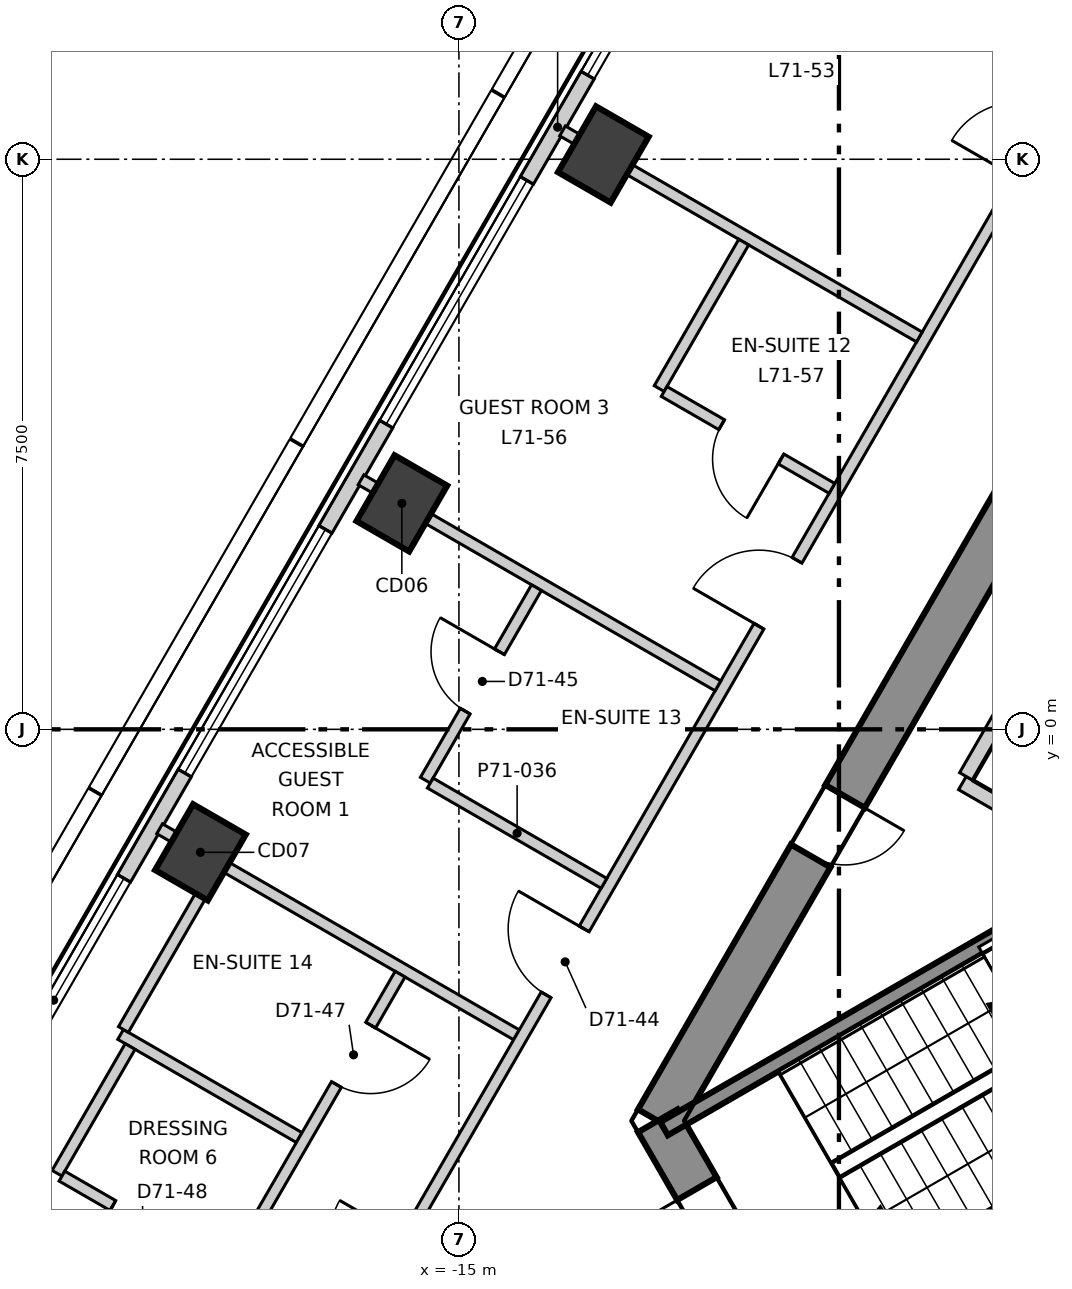
"""IFC4 building model, lengths in metres.
Left out: names, types, materials, properties, quantities, classifications, styles, units other than length and angle.
Written with IfcOpenShell. Run it as: python <this file> out.ifc"""

import sys

from ifc_helpers import new_model, si_unit, direction, frame, frame_2d, origin, origin_2d, place, context, subcontext, project, spatial, polyline, rectangle, outline, extrude, element, fill, save


model = new_model("IFC4")
c1 = context("Model", 3, precision=1e-05, world=origin(), true_north=direction((0.0, 1.0)))
c2 = subcontext(c1, "Body", "Model", "MODEL_VIEW")
j1 = project(units=[si_unit("LENGTHUNIT", "METRE"), si_unit("PLANEANGLEUNIT", "RADIAN")], contexts=[c1])
p1 = place(None, origin())
s1 = spatial("IfcSite", under=j1, at=p1, CompositionType="ELEMENT")
p2 = place(p1, origin())
s2 = spatial("IfcBuilding", under=s1, at=p2, CompositionType="ELEMENT")
p3 = place(p2, frame((0.0, 0.0, 300.7)))
s3 = spatial("IfcBuildingStorey", under=s2, at=p3, CompositionType="ELEMENT", Elevation=300.7)
p4 = place(p3, frame((-1.732, 13.3, -0.3), z_axis=(0.0, 0.0, 1.0), x_axis=(-0.500000539815, -0.866025092122, 0.0)))
e1 = element("IfcWall", 1, at=p4, inside=s3, PredefinedType="SHEAR", context=c2, shape_type="SweptSolid", body=[
    extrude(outline(polyline([(-0.173, -0.3), (1.795, -0.3), (3.763, -0.3), (5.732, -0.3), (7.7, -0.3), (9.668, -0.301), (11.637, -0.301), (13.605, -0.301), (15.573, -0.301), (17.542, -0.301), (19.51, -0.301), (21.478, -0.301), (21.131, 0.3), (19.226, 0.3), (17.321, 0.3), (15.415, 0.3), (13.51, 0.3), (11.605, 0.3), (9.699, 0.3), (7.794, 0.3), (5.889, 0.3), (3.984, 0.3), (2.078, 0.3), (0.173, 0.3), (-0.173, -0.3)])), origin(), (0.0, 0.0, 1.0), 3.6),
])
p5 = place(p4, frame((10.102, 0.0, 0.3)))
e2 = element("IfcOpeningElement", 2, at=p5, cuts=e1, PredefinedType="OPENING", context=c2, shape_type="SweptSolid", body=[
    extrude(rectangle(XDim=1.1, YDim=2.1, at=frame_2d((0.55, 1.05))), frame((0.0, 0.31, 0.0), z_axis=(0.0, -1.0, 0.0), x_axis=(1.0, 0.0, 0.0)), (0.0, 0.0, 1.0), 0.621),
])
p6 = place(p4, frame((16.378, 0.0, 0.3)))
e3 = element("IfcOpeningElement", 3, at=p6, cuts=e1, PredefinedType="OPENING", context=c2, shape_type="SweptSolid", body=[
    extrude(rectangle(XDim=0.9, YDim=2.1, at=frame_2d((0.45, 1.05))), frame((0.0, 0.31, 0.0), z_axis=(0.0, -1.0, 0.0), x_axis=(1.0, 0.0, 0.0)), (0.0, 0.0, 1.0), 0.621),
])
p7 = place(p4, frame((4.026, 0.0, 0.3)))
e4 = element("IfcOpeningElement", 4, at=p7, cuts=e1, PredefinedType="OPENING", context=c2, shape_type="SweptSolid", body=[
    extrude(rectangle(XDim=0.9, YDim=2.1, at=frame_2d((0.45, 1.05))), frame((0.0, 0.31, 0.0), z_axis=(0.0, -1.0, 0.0), x_axis=(1.0, 0.0, 0.0)), (0.0, 0.0, 1.0), 0.621),
])
p8 = place(p3, frame((-12.384, -5.15, -0.3), z_axis=(0.0, 0.0, 1.0), x_axis=(0.49997462182, -0.866040055388, 0.0)))
e5 = element("IfcWall", 5, at=p8, inside=s3, PredefinedType="SHEAR", context=c2, shape_type="SweptSolid", body=[
    extrude(outline(polyline([(-0.173, -0.301), (1.732, -0.301), (3.637, -0.3), (3.291, 0.3), (1.732, 0.3), (0.173, 0.3), (-0.173, -0.301)])), origin(), (0.0, 0.0, 1.0), 3.6),
])
p9 = place(p8, frame((1.032, 0.0, 0.3)))
e6 = element("IfcOpeningElement", 6, at=p9, cuts=e5, PredefinedType="OPENING", context=c2, shape_type="SweptSolid", body=[
    extrude(rectangle(XDim=1.4, YDim=2.1, at=frame_2d((0.7, 1.05))), frame((0.0, 0.31, 0.0), z_axis=(0.0, -1.0, 0.0), x_axis=(1.0, 0.0, 0.0)), (0.0, 0.0, 1.0), 0.621),
])
for number, where, z_axis, x_axis in (
    (7, (-13.1, 7.563, -0.3), (0.0, 0.0, 1.0), (0.5, 0.866, 0.0)),
    (8, (-15.751, 2.973, -0.3), (0.0, 0.0, 1.0), (0.5, 0.866, 0.0)),
    (9, (-18.401, -1.618, -0.3), (0.0, 0.0, 1.0), (0.5, 0.866, 0.0)),
):
    element("IfcColumn", number, at=place(p3, frame(where, z_axis=z_axis, x_axis=x_axis)), inside=s3, PredefinedType="COLUMN", context=c2, shape_type="SweptSolid", body=[
        extrude(rectangle(XDim=1.0, YDim=0.8, at=origin_2d()), origin(), (0.0, 0.0, 1.0), 3.6),
    ])
p10 = place(p3, frame((-2.453, 27.405, 0.0), z_axis=(0.0, 0.0, 1.0), x_axis=(-0.500000041859, -0.866025379617, 0.0)))
e10 = element("IfcWall", 10, at=p10, inside=s3, PredefinedType="ELEMENTEDWALL", context=c2, shape_type="SweptSolid", body=[
    extrude(rectangle(XDim=44.994, YDim=0.2, at=frame_2d((22.497, 0.0))), origin(), (0.0, 0.0, 1.0), 3.3),
])
p11 = place(p10, frame((2.103, 0.0, 0.9)))
e11 = element("IfcOpeningElement", 11, at=p11, cuts=e10, PredefinedType="OPENING", context=c2, shape_type="SweptSolid", body=[
    extrude(rectangle(XDim=3.7, YDim=2.2, at=frame_2d((1.85, 1.1))), frame((0.0, 0.11, 0.0), z_axis=(0.0, -1.0, 0.0), x_axis=(1.0, 0.0, 0.0)), (0.0, 0.0, 1.0), 0.22),
])
p12 = place(p10, frame((7.404, 0.0, 0.9)))
e12 = element("IfcOpeningElement", 12, at=p12, cuts=e10, PredefinedType="OPENING", context=c2, shape_type="SweptSolid", body=[
    extrude(rectangle(XDim=3.7, YDim=2.2, at=frame_2d((1.85, 1.1))), frame((0.0, 0.11, 0.0), z_axis=(0.0, -1.0, 0.0), x_axis=(1.0, 0.0, 0.0)), (0.0, 0.0, 1.0), 0.22),
])
p13 = place(p10, frame((12.705, 0.0, 0.9)))
e13 = element("IfcOpeningElement", 13, at=p13, cuts=e10, PredefinedType="OPENING", context=c2, shape_type="SweptSolid", body=[
    extrude(rectangle(XDim=3.7, YDim=2.2, at=frame_2d((1.85, 1.1))), frame((0.0, 0.11, 0.0), z_axis=(0.0, -1.0, 0.0), x_axis=(1.0, 0.0, 0.0)), (0.0, 0.0, 1.0), 0.22),
])
p14 = place(p10, frame((18.006, 0.0, 0.9)))
e14 = element("IfcOpeningElement", 14, at=p14, cuts=e10, PredefinedType="OPENING", context=c2, shape_type="SweptSolid", body=[
    extrude(rectangle(XDim=3.7, YDim=2.2, at=frame_2d((1.85, 1.1))), frame((0.0, 0.11, 0.0), z_axis=(0.0, -1.0, 0.0), x_axis=(1.0, 0.0, 0.0)), (0.0, 0.0, 1.0), 0.22),
])
p15 = place(p10, frame((23.307, 0.0, 0.9)))
e15 = element("IfcOpeningElement", 15, at=p15, cuts=e10, PredefinedType="OPENING", context=c2, shape_type="SweptSolid", body=[
    extrude(rectangle(XDim=3.7, YDim=2.2, at=frame_2d((1.85, 1.1))), frame((0.0, 0.11, 0.0), z_axis=(0.0, -1.0, 0.0), x_axis=(1.0, 0.0, 0.0)), (0.0, 0.0, 1.0), 0.22),
])
p16 = place(p10, frame((28.608, 0.0, 0.9)))
e16 = element("IfcOpeningElement", 16, at=p16, cuts=e10, PredefinedType="OPENING", context=c2, shape_type="SweptSolid", body=[
    extrude(rectangle(XDim=3.7, YDim=2.2, at=frame_2d((1.85, 1.1))), frame((0.0, 0.11, 0.0), z_axis=(0.0, -1.0, 0.0), x_axis=(1.0, 0.0, 0.0)), (0.0, 0.0, 1.0), 0.22),
])
p17 = place(p10, frame((33.909, 0.0, 0.9)))
e17 = element("IfcOpeningElement", 17, at=p17, cuts=e10, PredefinedType="OPENING", context=c2, shape_type="SweptSolid", body=[
    extrude(rectangle(XDim=3.7, YDim=2.2, at=frame_2d((1.85, 1.1))), frame((0.0, 0.11, 0.0), z_axis=(0.0, -1.0, 0.0), x_axis=(1.0, 0.0, 0.0)), (0.0, 0.0, 1.0), 0.22),
])
p18 = place(p10, frame((39.21, 0.0, 0.9)))
e18 = element("IfcOpeningElement", 18, at=p18, cuts=e10, PredefinedType="OPENING", context=c2, shape_type="SweptSolid", body=[
    extrude(rectangle(XDim=3.7, YDim=2.2, at=frame_2d((1.85, 1.1))), frame((0.0, 0.11, 0.0), z_axis=(0.0, -1.0, 0.0), x_axis=(1.0, 0.0, 0.0)), (0.0, 0.0, 1.0), 0.22),
])
p19 = place(p3, frame((-18.938, -1.308, 0.0), z_axis=(0.0, 0.0, 1.0), x_axis=(0.866006352826, -0.500032995777, 0.0)))
e19 = element("IfcWall", 19, at=p19, inside=s3, PredefinedType="PARTITIONING", context=c2, shape_type="SweptSolid", body=[
    extrude(rectangle(XDim=5.422, YDim=0.15, at=frame_2d((2.711, 0.0))), origin(), (0.0, 0.0, 1.0), 3.3),
])
p20 = place(p3, frame((-17.679, -10.12, 0.0), z_axis=(0.0, 0.0, 1.0), x_axis=(0.500008955215, 0.866020233427, 0.0)))
e20 = element("IfcWall", 20, at=p20, inside=s3, PredefinedType="PARTITIONING", context=c2, shape_type="SweptSolid", body=[
    extrude(rectangle(XDim=35.357, YDim=0.15, at=frame_2d((17.679, 0.0))), origin(), (0.0, 0.0, 1.0), 3.3),
])
p21 = place(p20, frame((31.307, 0.0, 0.0)))
e21 = element("IfcOpeningElement", 21, at=p21, cuts=e20, PredefinedType="OPENING", context=c2, shape_type="SweptSolid", body=[
    extrude(rectangle(XDim=1.0, YDim=2.1, at=frame_2d((0.5, 1.05))), frame((0.0, 0.085, 0.0), z_axis=(0.0, -1.0, 0.0), x_axis=(1.0, 0.0, 0.0)), (0.0, 0.0, 1.0), 0.17),
])
p22 = place(p20, frame((20.056, 0.0, 0.0)))
e22 = element("IfcOpeningElement", 22, at=p22, cuts=e20, PredefinedType="OPENING", context=c2, shape_type="SweptSolid", body=[
    extrude(rectangle(XDim=1.0, YDim=2.1, at=frame_2d((0.5, 1.05))), frame((0.0, 0.085, 0.0), z_axis=(0.0, -1.0, 0.0), x_axis=(1.0, 0.0, 0.0)), (0.0, 0.0, 1.0), 0.17),
])
p23 = place(p20, frame((13.253, 0.0, 0.0)))
e23 = element("IfcOpeningElement", 23, at=p23, cuts=e20, PredefinedType="OPENING", context=c2, shape_type="SweptSolid", body=[
    extrude(rectangle(XDim=1.0, YDim=2.1, at=frame_2d((0.5, 1.05))), frame((0.0, 0.085, 0.0), z_axis=(0.0, -1.0, 0.0), x_axis=(1.0, 0.0, 0.0)), (0.0, 0.0, 1.0), 0.17),
])
p24 = place(p20, frame((7.653, 0.0, 0.0)))
e24 = element("IfcOpeningElement", 24, at=p24, cuts=e20, PredefinedType="OPENING", context=c2, shape_type="SweptSolid", body=[
    extrude(rectangle(XDim=1.0, YDim=2.1, at=frame_2d((0.5, 1.05))), frame((0.0, 0.085, 0.0), z_axis=(0.0, -1.0, 0.0), x_axis=(1.0, 0.0, 0.0)), (0.0, 0.0, 1.0), 0.17),
])
p25 = place(p20, frame((2.952, 0.0, 0.0)))
e25 = element("IfcOpeningElement", 25, at=p25, cuts=e20, PredefinedType="OPENING", context=c2, shape_type="SweptSolid", body=[
    extrude(rectangle(XDim=1.0, YDim=2.1, at=frame_2d((0.5, 1.05))), frame((0.0, 0.085, 0.0), z_axis=(0.0, -1.0, 0.0), x_axis=(1.0, 0.0, 0.0)), (0.0, 0.0, 1.0), 0.17),
])
p26 = place(p3, frame((-16.288, 3.283, 0.0), z_axis=(0.0, 0.0, 1.0), x_axis=(0.866051380023, -0.499955005135, 0.0)))
e26 = element("IfcWall", 26, at=p26, inside=s3, PredefinedType="PARTITIONING", context=c2, shape_type="SweptSolid", body=[
    extrude(rectangle(XDim=5.422, YDim=0.15, at=frame_2d((2.711, 0.0))), origin(), (0.0, 0.0, 1.0), 3.3),
])
p27 = place(p3, frame((-13.637, 7.873, 0.0), z_axis=(0.0, 0.0, 1.0), x_axis=(0.866006352826, -0.500032995777, 0.0)))
e27 = element("IfcWall", 27, at=p27, inside=s3, PredefinedType="PARTITIONING", context=c2, shape_type="SweptSolid", body=[
    extrude(rectangle(XDim=5.422, YDim=0.15, at=frame_2d((2.711, 0.0))), origin(), (0.0, 0.0, 1.0), 2.8),
])
p28 = place(p3, frame((-19.451, -4.014, 0.0), z_axis=(0.0, 0.0, 1.0), x_axis=(0.86594733563, -0.500135193638, 0.0)))
e28 = element("IfcWall", 28, at=p28, inside=s3, PredefinedType="PARTITIONING", context=c2, shape_type="SweptSolid", body=[
    extrude(rectangle(XDim=2.714, YDim=0.15, at=frame_2d((1.357, 0.0))), origin(), (0.0, 0.0, 1.0), 3.3),
])
p29 = place(p3, frame((-20.288, -5.84, 0.0), z_axis=(0.0, 0.0, 1.0), x_axis=(0.499890818081, 0.866088430819, 0.0)))
e29 = element("IfcWall", 29, at=p29, inside=s3, PredefinedType="PARTITIONING", context=c2, shape_type="SweptSolid", body=[
    extrude(rectangle(XDim=1.925, YDim=0.15, at=frame_2d((0.962, 0.0))), origin(), (0.0, 0.0, 1.0), 2.6),
])
p30 = place(p3, frame((-20.223, -5.878, 0.0), z_axis=(0.0, 0.0, 1.0), x_axis=(0.866146950478, -0.499789415832, 0.0)))
e30 = element("IfcWall", 30, at=p30, inside=s3, PredefinedType="PARTITIONING", context=c2, shape_type="SweptSolid", body=[
    extrude(rectangle(XDim=2.525, YDim=0.15, at=frame_2d((1.262, 0.0))), origin(), (0.0, 0.0, 1.0), 3.3),
])
p31 = place(p30, frame((0.775, 0.0, 0.0)))
e31 = element("IfcOpeningElement", 31, at=p31, cuts=e30, PredefinedType="OPENING", context=c2, shape_type="SweptSolid", body=[
    extrude(rectangle(XDim=0.9, YDim=2.1, at=frame_2d((0.45, 1.05))), frame((0.0, 0.085, 0.0), z_axis=(0.0, -1.0, 0.0), x_axis=(1.0, 0.0, 0.0)), (0.0, 0.0, 1.0), 0.17),
])
p32 = place(p3, frame((-17.999, -7.075, 0.0), z_axis=(0.0, 0.0, 1.0), x_axis=(0.49999788721, 0.866026623601, 0.0)))
e32 = element("IfcWall", 32, at=p32, inside=s3, PredefinedType="PARTITIONING", context=c2, shape_type="SweptSolid", body=[
    extrude(rectangle(XDim=4.45, YDim=0.15, at=frame_2d((2.225, 0.0))), origin(), (0.0, 0.0, 1.0), 3.3),
])
p33 = place(p32, frame((2.775, 0.0, 0.0)))
e33 = element("IfcOpeningElement", 33, at=p33, cuts=e32, PredefinedType="OPENING", context=c2, shape_type="SweptSolid", body=[
    extrude(rectangle(XDim=0.9, YDim=2.1, at=frame_2d((0.45, 1.05))), frame((0.0, 0.085, 0.0), z_axis=(0.0, -1.0, 0.0), x_axis=(1.0, 0.0, 0.0)), (0.0, 0.0, 1.0), 0.17),
])
p34 = place(p3, frame((-19.414, -3.949, 0.0), z_axis=(0.0, 0.0, 1.0), x_axis=(0.499975448907, 0.8660395779, 0.0)))
e34 = element("IfcWall", 34, at=p34, inside=s3, PredefinedType="PARTITIONING", context=c2, shape_type="SweptSolid", body=[
    extrude(rectangle(XDim=2.45, YDim=0.15, at=frame_2d((1.225, 0.0))), origin(), (0.0, 0.0, 1.0), 2.6),
])
p35 = place(p3, frame((-15.442, -0.669, 0.0), z_axis=(0.0, 0.0, 1.0), x_axis=(0.499874209568, 0.866098016745, 0.0)))
e35 = element("IfcWall", 35, at=p35, inside=s3, PredefinedType="PARTITIONING", context=c2, shape_type="SweptSolid", body=[
    extrude(rectangle(XDim=2.925, YDim=0.15, at=frame_2d((1.462, 0.0))), origin(), (0.0, 0.0, 1.0), 3.3),
])
p36 = place(p35, frame((1.05, 0.0, 0.0)))
e36 = element("IfcOpeningElement", 36, at=p36, cuts=e35, PredefinedType="OPENING", context=c2, shape_type="SweptSolid", body=[
    extrude(rectangle(XDim=0.9, YDim=2.1, at=frame_2d((0.45, 1.05))), frame((0.0, 0.085, 0.0), z_axis=(0.0, -1.0, 0.0), x_axis=(1.0, 0.0, 0.0)), (0.0, 0.0, 1.0), 0.17),
])
p37 = place(p3, frame((-15.377, -0.707, 0.0), z_axis=(0.0, 0.0, 1.0), x_axis=(0.86608234587, -0.499901360443, 0.0)))
e37 = element("IfcWall", 37, at=p37, inside=s3, PredefinedType="PARTITIONING", context=c2, shape_type="SweptSolid", body=[
    extrude(rectangle(XDim=2.638, YDim=0.15, at=frame_2d((1.319, 0.0))), origin(), (0.0, 0.0, 1.0), 3.3),
])
p38 = place(p3, frame((-12.365, 4.483, 0.0), z_axis=(0.0, 0.0, 1.0), x_axis=(0.499833278392, 0.866121639155, 0.0)))
e38 = element("IfcWall", 38, at=p38, inside=s3, PredefinedType="PARTITIONING", context=c2, shape_type="SweptSolid", body=[
    extrude(rectangle(XDim=2.225, YDim=0.15, at=frame_2d((1.112, 0.0))), origin(), (0.0, 0.0, 1.0), 3.3),
])
p39 = place(p3, frame((-12.3, 4.445, 0.0), z_axis=(0.0, 0.0, 1.0), x_axis=(0.865965520905, -0.500103705848, 0.0)))
e39 = element("IfcWall", 39, at=p39, inside=s3, PredefinedType="PARTITIONING", context=c2, shape_type="SweptSolid", body=[
    extrude(rectangle(XDim=2.55, YDim=0.15, at=frame_2d((1.275, 0.0))), origin(), (0.0, 0.0, 1.0), 3.3),
])
p40 = place(p39, frame((0.875, 0.0, 0.0)))
e40 = element("IfcOpeningElement", 40, at=p40, cuts=e39, PredefinedType="OPENING", context=c2, shape_type="SweptSolid", body=[
    extrude(rectangle(XDim=0.9, YDim=2.1, at=frame_2d((0.45, 1.05))), frame((0.0, 0.085, 0.0), z_axis=(0.0, -1.0, 0.0), x_axis=(1.0, 0.0, 0.0)), (0.0, 0.0, 1.0), 0.17),
])
p41 = place(p3, frame((-8.376, -0.707, 0.0), z_axis=(0.0, 0.0, 1.0), x_axis=(0.866067520717, -0.499927044236, 0.0)))
e41 = element("IfcWall", 41, at=p41, inside=s3, PredefinedType="SOLIDWALL", context=c2, shape_type="SweptSolid", body=[
    extrude(rectangle(XDim=2.1, YDim=0.2, at=frame_2d((1.05, 0.0))), origin(), (0.0, 0.0, 1.0), 3.3),
])
p42 = place(p3, frame((-8.326, -0.62, 0.0), z_axis=(0.0, 0.0, 1.0), x_axis=(0.500023687443, 0.866011727401, 0.0)))
e42 = element("IfcWall", 42, at=p42, inside=s3, PredefinedType="SOLIDWALL", context=c2, shape_type="SweptSolid", body=[
    extrude(rectangle(XDim=2.9, YDim=0.2, at=frame_2d((1.45, 0.0))), origin(), (0.0, 0.0, 1.0), 3.3),
])
p43 = place(p3, frame((-12.301, -5.254, 0.0), z_axis=(0.0, 0.0, 1.0), x_axis=(0.866068467981, 0.499925403204, 0.0)))
e43 = element("IfcWall", 43, at=p43, inside=s3, PredefinedType="SOLIDWALL", context=c2, shape_type="SweptSolid", body=[
    extrude(rectangle(XDim=6.665, YDim=0.2, at=frame_2d((3.332, 0.0))), origin(), (0.0, 0.0, 1.0), 3.3),
])
p44 = place(p3, frame((-10.701, -8.026, 0.0), z_axis=(0.0, 0.0, 1.0), x_axis=(0.866005022404, 0.500035299925, 0.0)))
e44 = element("IfcWall", 44, at=p44, inside=s3, PredefinedType="SOLIDWALL", context=c2, shape_type="SweptSolid", body=[
    extrude(rectangle(XDim=6.665, YDim=0.2, at=frame_2d((3.333, 0.0))), origin(), (0.0, 0.0, 1.0), 3.3),
])
p45 = place(p14, origin())
e45 = element("IfcWindow", 45, at=p45, inside=s3, PartitioningType="SINGLE_PANEL", PredefinedType="WINDOW", context=c2, shape_type="SweptSolid", body=[
    extrude(rectangle(XDim=3.7, YDim=2.2, at=frame_2d((1.85, 1.1))), frame((0.0, 0.03, 0.0), z_axis=(0.0, -1.0, 0.0), x_axis=(1.0, 0.0, 0.0)), (0.0, 0.0, 1.0), 0.06),
])
fill(e14, e45)
p46 = place(p15, origin())
e46 = element("IfcWindow", 46, at=p46, inside=s3, PartitioningType="SINGLE_PANEL", PredefinedType="WINDOW", context=c2, shape_type="SweptSolid", body=[
    extrude(rectangle(XDim=3.7, YDim=2.2, at=frame_2d((1.85, 1.1))), frame((0.0, 0.03, 0.0), z_axis=(0.0, -1.0, 0.0), x_axis=(1.0, 0.0, 0.0)), (0.0, 0.0, 1.0), 0.06),
])
fill(e15, e46)
p47 = place(p16, origin())
e47 = element("IfcWindow", 47, at=p47, inside=s3, PartitioningType="SINGLE_PANEL", PredefinedType="WINDOW", context=c2, shape_type="SweptSolid", body=[
    extrude(rectangle(XDim=3.7, YDim=2.2, at=frame_2d((1.85, 1.1))), frame((0.0, 0.03, 0.0), z_axis=(0.0, -1.0, 0.0), x_axis=(1.0, 0.0, 0.0)), (0.0, 0.0, 1.0), 0.06),
])
fill(e16, e47)
p48 = place(p17, origin())
e48 = element("IfcWindow", 48, at=p48, inside=s3, PartitioningType="SINGLE_PANEL", PredefinedType="WINDOW", context=c2, shape_type="SweptSolid", body=[
    extrude(rectangle(XDim=3.7, YDim=2.2, at=frame_2d((1.85, 1.1))), frame((0.0, 0.03, 0.0), z_axis=(0.0, -1.0, 0.0), x_axis=(1.0, 0.0, 0.0)), (0.0, 0.0, 1.0), 0.06),
])
fill(e17, e48)
p49 = place(p23, origin())
e49 = element("IfcDoor", 49, at=p49, inside=s3, OperationType="SINGLE_SWING_RIGHT", PredefinedType="DOOR", context=c2, shape_type="SweptSolid", body=[
    extrude(rectangle(XDim=1.0, YDim=2.1, at=frame_2d((0.5, 1.05))), frame((0.0, 0.025, 0.0), z_axis=(0.0, -1.0, 0.0), x_axis=(1.0, 0.0, 0.0)), (0.0, 0.0, 1.0), 0.05),
])
fill(e23, e49)
p50 = place(p40, origin())
e50 = element("IfcDoor", 50, at=p50, inside=s3, OperationType="SINGLE_SWING_RIGHT", PredefinedType="DOOR", context=c2, shape_type="SweptSolid", body=[
    extrude(rectangle(XDim=0.9, YDim=2.1, at=frame_2d((0.45, 1.05))), frame((0.0, 0.025, 0.0), z_axis=(0.0, -1.0, 0.0), x_axis=(1.0, 0.0, 0.0)), (0.0, 0.0, 1.0), 0.05),
])
fill(e40, e50)
p51 = place(p24, origin())
e51 = element("IfcDoor", 51, at=p51, inside=s3, OperationType="SINGLE_SWING_LEFT", PredefinedType="DOOR", context=c2, shape_type="SweptSolid", body=[
    extrude(rectangle(XDim=1.0, YDim=2.1, at=frame_2d((0.5, 1.05))), frame((0.0, 0.025, 0.0), z_axis=(0.0, -1.0, 0.0), x_axis=(1.0, 0.0, 0.0)), (0.0, 0.0, 1.0), 0.05),
])
fill(e24, e51)
p52 = place(p36, origin())
e52 = element("IfcDoor", 52, at=p52, inside=s3, OperationType="SINGLE_SWING_LEFT", PredefinedType="DOOR", context=c2, shape_type="SweptSolid", body=[
    extrude(rectangle(XDim=0.9, YDim=2.1, at=frame_2d((0.45, 1.05))), frame((0.0, 0.025, 0.0), z_axis=(0.0, -1.0, 0.0), x_axis=(1.0, 0.0, 0.0)), (0.0, 0.0, 1.0), 0.05),
])
fill(e36, e52)
p53 = place(p33, origin())
e53 = element("IfcDoor", 53, at=p53, inside=s3, OperationType="SINGLE_SWING_RIGHT", PredefinedType="DOOR", context=c2, shape_type="SweptSolid", body=[
    extrude(rectangle(XDim=0.9, YDim=2.1, at=frame_2d((0.45, 1.05))), frame((0.0, 0.025, 0.0), z_axis=(0.0, -1.0, 0.0), x_axis=(1.0, 0.0, 0.0)), (0.0, 0.0, 1.0), 0.05),
])
fill(e33, e53)
p54 = place(p31, origin())
e54 = element("IfcDoor", 54, at=p54, inside=s3, OperationType="SINGLE_SWING_LEFT", PredefinedType="DOOR", context=c2, shape_type="SweptSolid", body=[
    extrude(rectangle(XDim=0.9, YDim=2.1, at=frame_2d((0.45, 1.05))), frame((0.0, 0.025, 0.0), z_axis=(0.0, -1.0, 0.0), x_axis=(1.0, 0.0, 0.0)), (0.0, 0.0, 1.0), 0.05),
])
fill(e31, e54)
p55 = place(p9, origin())
e55 = element("IfcDoor", 55, at=p55, inside=s3, OperationType="DOUBLE_DOOR_SINGLE_SWING", PredefinedType="DOOR", context=c2, shape_type="SweptSolid", body=[
    extrude(rectangle(XDim=1.4, YDim=2.1, at=frame_2d((0.7, 1.05))), frame((0.0, 0.025, 0.0), z_axis=(0.0, -1.0, 0.0), x_axis=(1.0, 0.0, 0.0)), (0.0, 0.0, 1.0), 0.05),
])
fill(e6, e55)
p56 = place(p6, origin())
e56 = element("IfcDoor", 56, at=p56, inside=s3, OperationType="SINGLE_SWING_RIGHT", PredefinedType="DOOR", context=c2, shape_type="SweptSolid", body=[
    extrude(rectangle(XDim=0.9, YDim=2.1, at=frame_2d((0.45, 1.05))), frame((0.0, 0.025, 0.0), z_axis=(0.0, -1.0, 0.0), x_axis=(1.0, 0.0, 0.0)), (0.0, 0.0, 1.0), 0.05),
])
fill(e3, e56)
save(model, sys.argv[1])
